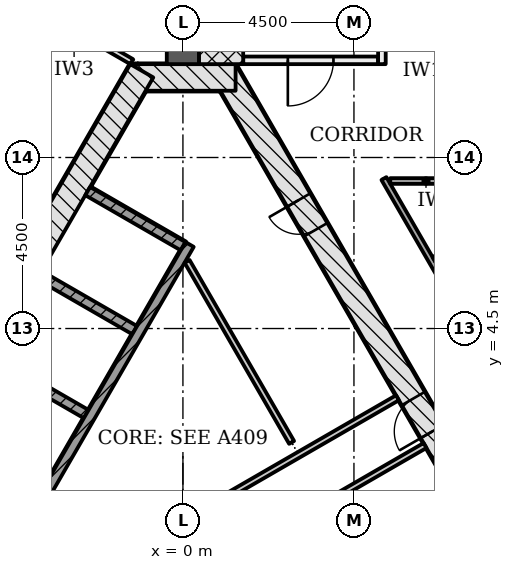
"""IFC4 building model, lengths in metres.
Left out: names, types, materials, properties, quantities, classifications, styles, units other than length and angle.
Written with IfcOpenShell. Run it as: python <this file> out.ifc"""

import sys

from ifc_helpers import new_model, si_unit, direction, frame, frame_2d, origin, place, context, subcontext, project, spatial, rectangle, extrude, element, fill, save


model = new_model("IFC4")
c1 = context("Model", 3, precision=1e-05, world=origin(), true_north=direction((0.0, 1.0)))
c2 = subcontext(c1, "Body", "Model", "MODEL_VIEW")
j1 = project(units=[si_unit("LENGTHUNIT", "METRE"), si_unit("PLANEANGLEUNIT", "RADIAN")], contexts=[c1])
p1 = place(None, origin())
s1 = spatial("IfcSite", under=j1, at=p1, CompositionType="ELEMENT")
p2 = place(p1, origin())
s2 = spatial("IfcBuilding", under=s1, at=p2, CompositionType="ELEMENT")
p3 = place(p2, frame((0.0, 0.0, 58.2)))
s3 = spatial("IfcBuildingStorey", under=s2, at=p3, CompositionType="ELEMENT", Elevation=58.2)
p4 = place(p3, frame((10.311, -4.703, -0.2), z_axis=(0.0, 0.0, 1.0), x_axis=(-0.500001446645, 0.866024568562, 0.0)))
e1 = element("IfcWall", 1, at=p4, inside=s3, PredefinedType="SHEAR", context=c2, shape_type="SweptSolid", body=[
    extrude(rectangle(XDim=18.458, YDim=0.7, at=frame_2d((9.229, 0.0))), origin(), (0.0, 0.0, 1.0), 3.6),
])
p5 = place(p4, frame((7.5, 0.0, 0.2)))
e2 = element("IfcOpeningElement", 2, at=p5, cuts=e1, PredefinedType="OPENING", context=c2, shape_type="SweptSolid", body=[
    extrude(rectangle(XDim=1.0, YDim=2.1, at=frame_2d((0.5, 1.05))), frame((0.0, 0.36, 0.0), z_axis=(0.0, -1.0, 0.0), x_axis=(1.0, 0.0, 0.0)), (0.0, 0.0, 1.0), 0.72),
])
p6 = place(p4, frame((1.852, 0.0, 0.2)))
e3 = element("IfcOpeningElement", 3, at=p6, cuts=e1, PredefinedType="OPENING", context=c2, shape_type="SweptSolid", body=[
    extrude(rectangle(XDim=0.9, YDim=2.1, at=frame_2d((0.45, 1.05))), frame((0.0, 0.36, 0.0), z_axis=(0.0, -1.0, 0.0), x_axis=(1.0, 0.0, 0.0)), (0.0, 0.0, 1.0), 0.72),
])
p7 = place(p4, frame((5.238, 0.0, 0.2)))
e4 = element("IfcOpeningElement", 4, at=p7, cuts=e1, PredefinedType="OPENING", context=c2, shape_type="SweptSolid", body=[
    extrude(rectangle(XDim=1.0, YDim=2.1, at=frame_2d((0.5, 1.05))), frame((0.0, 0.36, 0.0), z_axis=(0.0, -1.0, 0.0), x_axis=(1.0, 0.0, 0.0)), (0.0, 0.0, 1.0), 0.72),
])
p8 = place(p4, frame((13.63, 0.0, 0.2)))
e5 = element("IfcOpeningElement", 5, at=p8, cuts=e1, PredefinedType="OPENING", context=c2, shape_type="SweptSolid", body=[
    extrude(rectangle(XDim=0.9, YDim=2.1, at=frame_2d((0.45, 1.05))), frame((0.0, 0.36, 0.0), z_axis=(0.0, -1.0, 0.0), x_axis=(1.0, 0.0, 0.0)), (0.0, 0.0, 1.0), 0.72),
])
p9 = place(p3, frame((1.386, 11.106, -0.2), z_axis=(0.0, 0.0, 1.0), x_axis=(-1.0, 0.0, 0.0)))
e6 = element("IfcWall", 6, at=p9, inside=s3, PredefinedType="SHEAR", context=c2, shape_type="SweptSolid", body=[
    extrude(rectangle(XDim=2.771, YDim=0.7, at=frame_2d((1.386, 0.0))), origin(), (0.0, 0.0, 1.0), 3.6),
])
p10 = place(p3, frame((-1.083, 11.281, -0.2), z_axis=(0.0, 0.0, 1.0), x_axis=(-0.500001446645, -0.866024568562, 0.0)))
e7 = element("IfcWall", 7, at=p10, inside=s3, PredefinedType="SHEAR", context=c2, shape_type="SweptSolid", body=[
    extrude(rectangle(XDim=18.458, YDim=0.7, at=frame_2d((9.229, 0.0))), origin(), (0.0, 0.0, 1.0), 3.6),
])
p11 = place(p10, frame((8.979, 0.0, 0.2)))
e8 = element("IfcOpeningElement", 8, at=p11, cuts=e7, PredefinedType="OPENING", context=c2, shape_type="SweptSolid", body=[
    extrude(rectangle(XDim=1.2, YDim=2.1, at=frame_2d((0.6, 1.05))), frame((0.0, 0.36, 0.0), z_axis=(0.0, -1.0, 0.0), x_axis=(1.0, 0.0, 0.0)), (0.0, 0.0, 1.0), 0.72),
])
p12 = place(p10, frame((11.029, 0.0, 0.2)))
e9 = element("IfcOpeningElement", 9, at=p12, cuts=e7, PredefinedType="OPENING", context=c2, shape_type="SweptSolid", body=[
    extrude(rectangle(XDim=1.2, YDim=2.1, at=frame_2d((0.6, 1.05))), frame((0.0, 0.36, 0.0), z_axis=(0.0, -1.0, 0.0), x_axis=(1.0, 0.0, 0.0)), (0.0, 0.0, 1.0), 0.72),
])
p13 = place(p3, frame((0.0, 11.456, -0.2), z_axis=(0.0, 0.0, 1.0), x_axis=(0.0, 1.0, 0.0)))
e10 = element("IfcWall", 10, at=p13, inside=s3, PredefinedType="SHEAR", context=c2, shape_type="SweptSolid", body=[
    extrude(rectangle(XDim=13.699, YDim=0.85, at=frame_2d((6.849, 0.0))), origin(), (0.0, 0.0, 1.0), 3.6),
])
p14 = place(p3, frame((-2.506, 8.115, -0.2), z_axis=(0.0, 0.0, 1.0), x_axis=(0.865996321171, -0.50005036918, 0.0)))
e11 = element("IfcWall", 11, at=p14, inside=s3, PredefinedType="PARTITIONING", context=c2, shape_type="SweptSolid", body=[
    extrude(rectangle(XDim=2.9, YDim=0.25, at=frame_2d((1.45, 0.0))), origin(), (0.0, 0.0, 1.0), 3.6),
])
for number, where, z_axis, x_axis in (
    (12, (-3.781, 5.907, -0.2), (0.0, 0.0, 1.0), (0.866, -0.5, 0.0)),
    (13, (-5.056, 3.699, -0.2), (0.0, 0.0, 1.0), (0.866, -0.5, 0.0)),
):
    element("IfcWall", number, at=place(p3, frame(where, z_axis=z_axis, x_axis=x_axis)), inside=s3, PredefinedType="PARTITIONING", context=c2, shape_type="SweptSolid", body=[
        extrude(rectangle(XDim=2.9, YDim=0.25, at=frame_2d((1.45, 0.0))), origin(), (0.0, 0.0, 1.0), 3.6),
    ])
p15 = place(p3, frame((0.176, 6.711, 0.0), z_axis=(0.0, 0.0, 1.0), x_axis=(-0.500004227369, -0.866022963098, 0.0)))
e14 = element("IfcWall", 14, at=p15, inside=s3, PredefinedType="PARTITIONING", context=c2, shape_type="SweptSolid", body=[
    extrude(rectangle(XDim=11.8, YDim=0.25, at=frame_2d((5.9, 0.0))), origin(), (0.0, 0.0, 1.0), 3.4),
])
p16 = place(p3, frame((-4.904, -3.413, 0.0), z_axis=(0.0, 0.0, 1.0), x_axis=(0.866020716117, 0.500008119189, 0.0)))
e15 = element("IfcWall", 15, at=p16, inside=s3, PredefinedType="PARTITIONING", context=c2, shape_type="SweptSolid", body=[
    extrude(rectangle(XDim=12.182, YDim=0.15, at=frame_2d((6.091, 0.0))), origin(), (0.0, 0.0, 1.0), 3.4),
])
p17 = place(p16, frame((4.142, 0.0, 0.0)))
e16 = element("IfcOpeningElement", 16, at=p17, cuts=e15, PredefinedType="OPENING", context=c2, shape_type="SweptSolid", body=[
    extrude(rectangle(XDim=0.9, YDim=2.1, at=frame_2d((0.45, 1.05))), frame((0.0, 0.085, 0.0), z_axis=(0.0, -1.0, 0.0), x_axis=(1.0, 0.0, 0.0)), (0.0, 0.0, 1.0), 0.17),
])
p18 = place(p3, frame((-2.004, -3.413, 0.0), z_axis=(0.0, 0.0, 1.0), x_axis=(0.866030034802, 0.499991978756, 0.0)))
e17 = element("IfcWall", 17, at=p18, inside=s3, PredefinedType="PARTITIONING", context=c2, shape_type="SweptSolid", body=[
    extrude(rectangle(XDim=9.671, YDim=0.15, at=frame_2d((4.835, 0.0))), origin(), (0.0, 0.0, 1.0), 3.4),
])
p19 = place(p18, frame((2.886, 0.0, 0.0)))
e18 = element("IfcOpeningElement", 18, at=p19, cuts=e17, PredefinedType="OPENING", context=c2, shape_type="SweptSolid", body=[
    extrude(rectangle(XDim=0.9, YDim=2.1, at=frame_2d((0.45, 1.05))), frame((0.0, 0.085, 0.0), z_axis=(0.0, -1.0, 0.0), x_axis=(1.0, 0.0, 0.0)), (0.0, 0.0, 1.0), 0.17),
])
p20 = place(p3, frame((2.86, 1.503, 0.0), z_axis=(0.0, 0.0, 1.0), x_axis=(-0.500014382217, 0.866017100048, 0.0)))
e19 = element("IfcWall", 19, at=p20, inside=s3, PredefinedType="PARTITIONING", context=c2, shape_type="SweptSolid", body=[
    extrude(rectangle(XDim=5.502, YDim=0.15, at=frame_2d((2.751, 0.0))), origin(), (0.0, 0.0, 1.0), 3.4),
])
p21 = place(p3, frame((5.135, 11.556, -0.2), z_axis=(0.0, 0.0, 1.0), x_axis=(-1.0, 0.0, 0.0)))
e20 = element("IfcWall", 20, at=p21, inside=s3, PredefinedType="SHEAR", context=c2, shape_type="SweptSolid", body=[
    extrude(rectangle(XDim=3.55, YDim=0.2, at=frame_2d((1.775, 0.0))), origin(), (0.0, 0.0, 1.0), 3.6),
])
p22 = place(p21, frame((1.175, 0.0, 0.2)))
e21 = element("IfcOpeningElement", 21, at=p22, cuts=e20, PredefinedType="OPENING", context=c2, shape_type="SweptSolid", body=[
    extrude(rectangle(XDim=1.2, YDim=2.1, at=frame_2d((0.6, 1.05))), frame((0.0, 0.11, 0.0), z_axis=(0.0, -1.0, 0.0), x_axis=(1.0, 0.0, 0.0)), (0.0, 0.0, 1.0), 0.22),
])
p23 = place(p3, frame((5.236, 11.456, -0.2), z_axis=(0.0, 0.0, 1.0), x_axis=(0.0, 1.0, 0.0)))
e22 = element("IfcWall", 22, at=p23, inside=s3, PredefinedType="SHEAR", context=c2, shape_type="SweptSolid", body=[
    extrude(rectangle(XDim=5.6, YDim=0.2, at=frame_2d((2.8, 0.0))), origin(), (0.0, 0.0, 1.0), 3.6),
])
p24 = place(p23, frame((0.45, 0.0, 0.2)))
e23 = element("IfcOpeningElement", 23, at=p24, cuts=e22, PredefinedType="OPENING", context=c2, shape_type="SweptSolid", body=[
    extrude(rectangle(XDim=1.2, YDim=2.1, at=frame_2d((0.6, 1.05))), frame((0.0, 0.11, 0.0), z_axis=(0.0, -1.0, 0.0), x_axis=(1.0, 0.0, 0.0)), (0.0, 0.0, 1.0), 0.22),
])
p25 = place(p3, frame((1.005, 11.456, -0.2), z_axis=(0.0, 0.0, 1.0), x_axis=(0.0, 1.0, 0.0)))
e24 = element("IfcWall", 24, at=p25, inside=s3, PredefinedType="SHEAR", context=c2, shape_type="SweptSolid", body=[
    extrude(rectangle(XDim=7.2, YDim=1.161, at=frame_2d((3.6, 0.0))), origin(), (0.0, 0.0, 1.0), 3.6),
])
p26 = place(p3, frame((5.289, 8.446, 0.0), z_axis=(0.0, 0.0, 1.0), x_axis=(0.499996620721, -0.866027354803, 0.0)))
e25 = element("IfcWall", 25, at=p26, inside=s3, PredefinedType="PARTITIONING", context=c2, shape_type="SweptSolid", body=[
    extrude(rectangle(XDim=15.057, YDim=0.15, at=frame_2d((7.528, 0.0))), origin(), (0.0, 0.0, 1.0), 2.778),
])
p27 = place(p26, frame((12.563, 0.0, 0.0)))
e26 = element("IfcOpeningElement", 26, at=p27, cuts=e25, PredefinedType="OPENING", context=c2, shape_type="SweptSolid", body=[
    extrude(rectangle(XDim=1.0, YDim=2.1, at=frame_2d((0.5, 1.05))), frame((0.0, 0.085, 0.0), z_axis=(0.0, -1.0, 0.0), x_axis=(1.0, 0.0, 0.0)), (0.0, 0.0, 1.0), 0.17),
])
p28 = place(p26, frame((7.312, 0.0, 0.0)))
e27 = element("IfcOpeningElement", 27, at=p28, cuts=e25, PredefinedType="OPENING", context=c2, shape_type="SweptSolid", body=[
    extrude(rectangle(XDim=1.0, YDim=2.1, at=frame_2d((0.5, 1.05))), frame((0.0, 0.085, 0.0), z_axis=(0.0, -1.0, 0.0), x_axis=(1.0, 0.0, 0.0)), (0.0, 0.0, 1.0), 0.17),
])
p29 = place(p26, frame((5.356, 0.0, 0.0)))
e28 = element("IfcOpeningElement", 28, at=p29, cuts=e25, PredefinedType="OPENING", context=c2, shape_type="SweptSolid", body=[
    extrude(rectangle(XDim=1.0, YDim=2.1, at=frame_2d((0.5, 1.05))), frame((0.0, 0.085, 0.0), z_axis=(0.0, -1.0, 0.0), x_axis=(1.0, 0.0, 0.0)), (0.0, 0.0, 1.0), 0.17),
])
p30 = place(p3, frame((-4.379, 13.271, 0.0), z_axis=(0.0, 0.0, 1.0), x_axis=(0.866019471182, -0.500010275428, 0.0)))
e29 = element("IfcWall", 29, at=p30, inside=s3, PredefinedType="PARTITIONING", context=c2, shape_type="SweptSolid", body=[
    extrude(rectangle(XDim=3.5, YDim=0.15, at=frame_2d((1.75, 0.0))), origin(), (0.0, 0.0, 1.0), 3.4),
])
p31 = place(p3, frame((5.456, 8.381, 0.0), z_axis=(0.0, 0.0, 1.0), x_axis=(1.0, 0.0, 0.0)))
e30 = element("IfcWall", 30, at=p31, inside=s3, PredefinedType="PARTITIONING", context=c2, shape_type="SweptSolid", body=[
    extrude(rectangle(XDim=1.88, YDim=0.15, at=frame_2d((0.94, 0.0))), origin(), (0.0, 0.0, 1.0), 3.4),
])
p32 = place(p3, frame((13.726, 10.514, 0.0), z_axis=(0.0, 0.0, 1.0), x_axis=(-0.861212761308, -0.508244606229, 0.0)))
e31 = element("IfcWall", 31, at=p32, inside=s3, PredefinedType="PARTITIONING", context=c2, shape_type="SweptSolid", body=[
    extrude(rectangle(XDim=8.266, YDim=0.15, at=frame_2d((4.133, 0.0))), origin(), (0.0, 0.0, 1.0), 2.778),
])
p33 = place(p5, origin())
e32 = element("IfcDoor", 32, at=p33, inside=s3, OperationType="SINGLE_SWING_LEFT", PredefinedType="DOOR", context=c2, shape_type="SweptSolid", body=[
    extrude(rectangle(XDim=1.0, YDim=2.1, at=frame_2d((0.5, 1.05))), frame((0.0, 0.075, 0.0), z_axis=(0.0, -1.0, 0.0), x_axis=(1.0, 0.0, 0.0)), (0.0, 0.0, 1.0), 0.15),
])
fill(e2, e32)
p34 = place(p8, origin())
e33 = element("IfcDoor", 33, at=p34, inside=s3, OperationType="SINGLE_SWING_RIGHT", PredefinedType="DOOR", context=c2, shape_type="SweptSolid", body=[
    extrude(rectangle(XDim=0.9, YDim=2.1, at=frame_2d((0.45, 1.05))), frame((0.0, 0.075, 0.0), z_axis=(0.0, -1.0, 0.0), x_axis=(1.0, 0.0, 0.0)), (0.0, 0.0, 1.0), 0.15),
])
fill(e5, e33)
p35 = place(p22, origin())
e34 = element("IfcDoor", 34, at=p35, inside=s3, OperationType="SINGLE_SWING_RIGHT", PredefinedType="DOOR", context=c2, shape_type="SweptSolid", body=[
    extrude(rectangle(XDim=1.2, YDim=2.1, at=frame_2d((0.6, 1.05))), frame((0.0, 0.025, 0.0), z_axis=(0.0, -1.0, 0.0), x_axis=(1.0, 0.0, 0.0)), (0.0, 0.0, 1.0), 0.05),
])
fill(e21, e34)
save(model, sys.argv[1])
